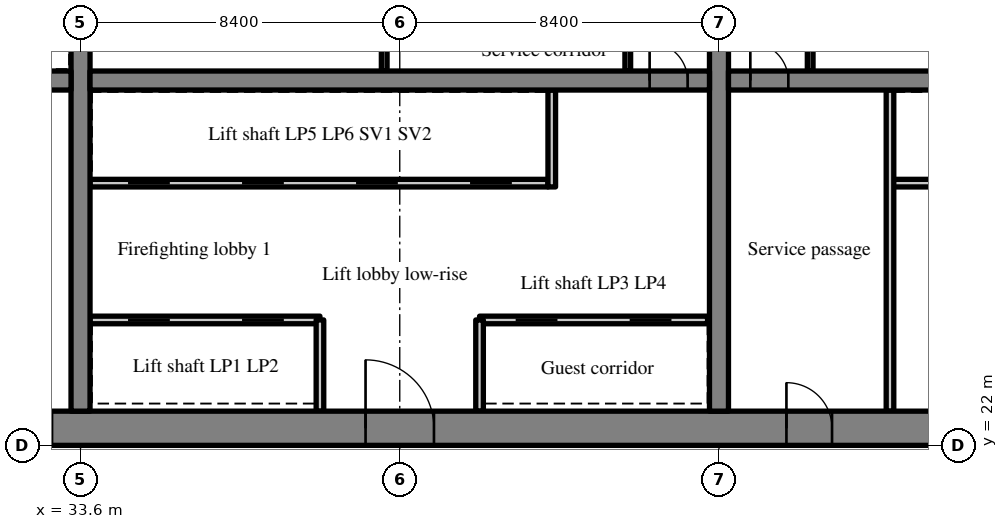
"""IFC4 building model, lengths in metres.
Left out: names, types, materials, properties, quantities, classifications, styles, units other than length and angle.
Written with IfcOpenShell. Run it as: python <this file> out.ifc"""

import sys

from ifc_helpers import new_model, si_unit, direction, frame, frame_2d, origin, place, context, subcontext, project, spatial, rectangle, extrude, source, transform, mapped, element, fill, save


model = new_model("IFC4")
c1 = context("Model", 3, precision=1e-05, world=origin(), true_north=direction((0.0, 1.0)))
c2 = subcontext(c1, "Body", "Model", "MODEL_VIEW")
j1 = project(units=[si_unit("LENGTHUNIT", "METRE"), si_unit("PLANEANGLEUNIT", "RADIAN")], contexts=[c1])
p1 = place(None, origin())
s1 = spatial("IfcSite", under=j1, at=p1, CompositionType="ELEMENT")
p2 = place(p1, origin())
s2 = spatial("IfcBuilding", under=s1, at=p2, CompositionType="ELEMENT")
p3 = place(p2, frame((0.0, 0.0, 106.6)))
s3 = spatial("IfcBuildingStorey", under=s2, at=p3, CompositionType="ELEMENT", Elevation=106.6)
m1 = source(origin(), c2, "Body", "SweptSolid", [
    extrude(rectangle(XDim=50.4, YDim=0.9, at=frame_2d((25.2, 0.0))), origin(), (0.0, 0.0, 1.0), 3.52),
])
p4 = place(p3, frame((25.2, 22.45, 0.0), z_axis=(0.0, 0.0, 1.0), x_axis=(1.0, 0.0, 0.0)))
e1 = element("IfcWall", 1, at=p4, inside=s3, PredefinedType="SHEAR", context=c2, shape_type="MappedRepresentation", body=[
    mapped(m1, transform((0.0, 0.0, 0.0), scale=1.0)),
])
m2 = source(origin(), c2, "Body", "SweptSolid", [
    extrude(rectangle(XDim=1.8, YDim=2.1, at=frame_2d((0.9, 1.05))), frame((0.0, 0.46, 0.0), z_axis=(0.0, -1.0, 0.0), x_axis=(1.0, 0.0, 0.0)), (0.0, 0.0, 1.0), 0.92),
])
p5 = place(p4, frame((15.9, 0.0, 0.0)))
e2 = element("IfcOpeningElement", 2, at=p5, cuts=e1, PredefinedType="OPENING", context=c2, shape_type="MappedRepresentation", body=[
    mapped(m2, transform((0.0, 0.0, 0.0), scale=1.0)),
])
m3 = source(origin(), c2, "Body", "SweptSolid", [
    extrude(rectangle(XDim=1.2, YDim=2.1, at=frame_2d((0.6, 1.05))), frame((0.0, 0.46, 0.0), z_axis=(0.0, -1.0, 0.0), x_axis=(1.0, 0.0, 0.0)), (0.0, 0.0, 1.0), 0.92),
])
p6 = place(p4, frame((26.975, 0.0, 0.0)))
e3 = element("IfcOpeningElement", 3, at=p6, cuts=e1, PredefinedType="OPENING", context=c2, shape_type="MappedRepresentation", body=[
    mapped(m3, transform((0.0, 0.0, 0.0), scale=1.0)),
])
m4 = source(origin(), c2, "Body", "SweptSolid", [
    extrude(rectangle(XDim=0.9, YDim=2.1, at=frame_2d((0.45, 1.05))), frame((0.0, 0.46, 0.0), z_axis=(0.0, -1.0, 0.0), x_axis=(1.0, 0.0, 0.0)), (0.0, 0.0, 1.0), 0.92),
])
p7 = place(p4, frame((32.25, 0.0, 0.0)))
e4 = element("IfcOpeningElement", 4, at=p7, cuts=e1, PredefinedType="OPENING", context=c2, shape_type="MappedRepresentation", body=[
    mapped(m4, transform((0.0, 0.0, 0.0), scale=1.0)),
])
p8 = place(p4, frame((38.275, 0.0, 0.0)))
e5 = element("IfcOpeningElement", 5, at=p8, cuts=e1, PredefinedType="OPENING", context=c2, shape_type="MappedRepresentation", body=[
    mapped(m4, transform((0.0, 0.0, 0.0), scale=1.0)),
])
p9 = place(p4, frame((6.45, 0.0, 0.0)))
e6 = element("IfcOpeningElement", 6, at=p9, cuts=e1, PredefinedType="OPENING", context=c2, shape_type="MappedRepresentation", body=[
    mapped(m3, transform((0.0, 0.0, 0.0), scale=1.0)),
])
p10 = place(p4, frame((47.775, 0.0, 0.0)))
e7 = element("IfcOpeningElement", 7, at=p10, cuts=e1, PredefinedType="OPENING", context=c2, shape_type="MappedRepresentation", body=[
    mapped(m3, transform((0.0, 0.0, 0.0), scale=1.0)),
])
m5 = source(origin(), c2, "Body", "SweptSolid", [
    extrude(rectangle(XDim=18.2, YDim=0.5, at=frame_2d((9.1, 0.0))), origin(), (0.0, 0.0, 1.0), 3.52),
])
p11 = place(p3, frame((33.6, 22.9, 0.0), z_axis=(0.0, 0.0, 1.0), x_axis=(0.0, 1.0, 0.0)))
e8 = element("IfcWall", 8, at=p11, inside=s3, PredefinedType="SHEAR", context=c2, shape_type="MappedRepresentation", body=[
    mapped(m5, transform((0.0, 0.0, 0.0), scale=1.0)),
])
m6 = source(origin(), c2, "Body", "SweptSolid", [
    extrude(rectangle(XDim=1.1, YDim=2.1, at=frame_2d((0.55, 1.05))), frame((0.0, 0.26, 0.0), z_axis=(0.0, -1.0, 0.0), x_axis=(1.0, 0.0, 0.0)), (0.0, 0.0, 1.0), 0.52),
])
p12 = place(p11, frame((12.55, 0.0, 0.0)))
e9 = element("IfcOpeningElement", 9, at=p12, cuts=e8, PredefinedType="OPENING", context=c2, shape_type="MappedRepresentation", body=[
    mapped(m6, transform((0.0, 0.0, 0.0), scale=1.0)),
])
p13 = place(p3, frame((50.4, 22.9, 0.0), z_axis=(0.0, 0.0, 1.0), x_axis=(0.0, 1.0, 0.0)))
e10 = element("IfcWall", 10, at=p13, inside=s3, PredefinedType="SHEAR", context=c2, shape_type="MappedRepresentation", body=[
    mapped(m5, transform((0.0, 0.0, 0.0), scale=1.0)),
])
p14 = place(p13, frame((12.55, 0.0, 0.0)))
e11 = element("IfcOpeningElement", 11, at=p14, cuts=e10, PredefinedType="OPENING", context=c2, shape_type="MappedRepresentation", body=[
    mapped(m6, transform((0.0, 0.0, 0.0), scale=1.0)),
])
m7 = source(origin(), c2, "Body", "SweptSolid", [
    extrude(rectangle(XDim=7.25, YDim=0.5, at=frame_2d((3.625, 0.0))), origin(), (0.0, 0.0, 1.0), 3.52),
])
p15 = place(p3, frame((26.1, 31.6, 0.0), z_axis=(0.0, 0.0, 1.0), x_axis=(1.0, 0.0, 0.0)))
e12 = element("IfcWall", 12, at=p15, inside=s3, PredefinedType="SHEAR", context=c2, shape_type="MappedRepresentation", body=[
    mapped(m7, transform((0.0, 0.0, 0.0), scale=1.0)),
])
p16 = place(p15, frame((5.6, 0.0, 0.0)))
e13 = element("IfcOpeningElement", 13, at=p16, cuts=e12, PredefinedType="OPENING", context=c2, shape_type="MappedRepresentation", body=[
    mapped(m6, transform((0.0, 0.0, 0.0), scale=1.0)),
])
m8 = source(origin(), c2, "Body", "SweptSolid", [
    extrude(rectangle(XDim=16.3, YDim=0.5, at=frame_2d((8.15, 0.0))), origin(), (0.0, 0.0, 1.0), 3.52),
])
p17 = place(p3, frame((33.85, 31.6, 0.0), z_axis=(0.0, 0.0, 1.0), x_axis=(1.0, 0.0, 0.0)))
e14 = element("IfcWall", 14, at=p17, inside=s3, PredefinedType="SHEAR", context=c2, shape_type="MappedRepresentation", body=[
    mapped(m8, transform((0.0, 0.0, 0.0), scale=1.0)),
])
m9 = source(origin(), c2, "Body", "SweptSolid", [
    extrude(rectangle(XDim=1.0, YDim=2.1, at=frame_2d((0.5, 1.05))), frame((0.0, 0.26, 0.0), z_axis=(0.0, -1.0, 0.0), x_axis=(1.0, 0.0, 0.0)), (0.0, 0.0, 1.0), 0.52),
])
p18 = place(p17, frame((14.725, 0.0, 0.0)))
e15 = element("IfcOpeningElement", 15, at=p18, cuts=e14, PredefinedType="OPENING", context=c2, shape_type="MappedRepresentation", body=[
    mapped(m9, transform((0.0, 0.0, 0.0), scale=1.0)),
])
m10 = source(origin(), c2, "Body", "SweptSolid", [
    extrude(rectangle(XDim=16.3, YDim=0.5, at=frame_2d((8.15, 0.0))), origin(), (0.0, 0.0, 1.0), 3.52),
])
p19 = place(p3, frame((50.65, 31.6, 0.0), z_axis=(0.0, 0.0, 1.0), x_axis=(1.0, 0.0, 0.0)))
e16 = element("IfcWall", 16, at=p19, inside=s3, PredefinedType="SHEAR", context=c2, shape_type="MappedRepresentation", body=[
    mapped(m10, transform((0.0, 0.0, 0.0), scale=1.0)),
])
p20 = place(p19, frame((0.575, 0.0, 0.0)))
e17 = element("IfcOpeningElement", 17, at=p20, cuts=e16, PredefinedType="OPENING", context=c2, shape_type="MappedRepresentation", body=[
    mapped(m9, transform((0.0, 0.0, 0.0), scale=1.0)),
])
m11 = source(origin(), c2, "Body", "SweptSolid", [
    extrude(rectangle(XDim=6.05, YDim=0.2, at=frame_2d((3.025, 0.0))), origin(), (0.0, 0.0, 1.0), 3.52),
])
p21 = place(p3, frame((33.85, 25.3, 0.0), z_axis=(0.0, 0.0, 1.0), x_axis=(1.0, 0.0, 0.0)))
e18 = element("IfcWall", 18, at=p21, inside=s3, PredefinedType="SOLIDWALL", context=c2, shape_type="MappedRepresentation", body=[
    mapped(m11, transform((0.0, 0.0, 0.0), scale=1.0)),
])
m12 = source(origin(), c2, "Body", "SweptSolid", [
    extrude(rectangle(XDim=1.1, YDim=2.1, at=frame_2d((0.55, 1.05))), frame((0.0, 0.11, 0.0), z_axis=(0.0, -1.0, 0.0), x_axis=(1.0, 0.0, 0.0)), (0.0, 0.0, 1.0), 0.22),
])
p22 = place(p21, frame((1.0, 0.0, 0.0)))
e19 = element("IfcOpeningElement", 19, at=p22, cuts=e18, PredefinedType="OPENING", context=c2, shape_type="MappedRepresentation", body=[
    mapped(m12, transform((0.0, 0.0, 0.0), scale=1.0)),
])
p23 = place(p21, frame((4.0, 0.0, 0.0)))
e20 = element("IfcOpeningElement", 20, at=p23, cuts=e18, PredefinedType="OPENING", context=c2, shape_type="MappedRepresentation", body=[
    mapped(m12, transform((0.0, 0.0, 0.0), scale=1.0)),
])
m13 = source(origin(), c2, "Body", "SweptSolid", [
    extrude(rectangle(XDim=6.0, YDim=0.2, at=frame_2d((3.0, 0.0))), origin(), (0.0, 0.0, 1.0), 3.52),
])
p24 = place(p3, frame((44.1, 25.3, 0.0), z_axis=(0.0, 0.0, 1.0), x_axis=(1.0, 0.0, 0.0)))
e21 = element("IfcWall", 21, at=p24, inside=s3, PredefinedType="SOLIDWALL", context=c2, shape_type="MappedRepresentation", body=[
    mapped(m13, transform((0.0, 0.0, 0.0), scale=1.0)),
])
p25 = place(p24, frame((0.95, 0.0, 0.0)))
e22 = element("IfcOpeningElement", 22, at=p25, cuts=e21, PredefinedType="OPENING", context=c2, shape_type="MappedRepresentation", body=[
    mapped(m12, transform((0.0, 0.0, 0.0), scale=1.0)),
])
p26 = place(p24, frame((3.95, 0.0, 0.0)))
e23 = element("IfcOpeningElement", 23, at=p26, cuts=e21, PredefinedType="OPENING", context=c2, shape_type="MappedRepresentation", body=[
    mapped(m12, transform((0.0, 0.0, 0.0), scale=1.0)),
])
m14 = source(origin(), c2, "Body", "SweptSolid", [
    extrude(rectangle(XDim=12.05, YDim=0.2, at=frame_2d((6.025, 0.0))), origin(), (0.0, 0.0, 1.0), 3.52),
])
p27 = place(p3, frame((33.85, 28.9, 0.0), z_axis=(0.0, 0.0, 1.0), x_axis=(1.0, 0.0, 0.0)))
e24 = element("IfcWall", 24, at=p27, inside=s3, PredefinedType="SOLIDWALL", context=c2, shape_type="MappedRepresentation", body=[
    mapped(m14, transform((0.0, 0.0, 0.0), scale=1.0)),
])
p28 = place(p27, frame((1.0, 0.0, 0.0)))
e25 = element("IfcOpeningElement", 25, at=p28, cuts=e24, PredefinedType="OPENING", context=c2, shape_type="MappedRepresentation", body=[
    mapped(m12, transform((0.0, 0.0, 0.0), scale=1.0)),
])
p29 = place(p27, frame((4.0, 0.0, 0.0)))
e26 = element("IfcOpeningElement", 26, at=p29, cuts=e24, PredefinedType="OPENING", context=c2, shape_type="MappedRepresentation", body=[
    mapped(m12, transform((0.0, 0.0, 0.0), scale=1.0)),
])
p30 = place(p27, frame((7.0, 0.0, 0.0)))
e27 = element("IfcOpeningElement", 27, at=p30, cuts=e24, PredefinedType="OPENING", context=c2, shape_type="MappedRepresentation", body=[
    mapped(m12, transform((0.0, 0.0, 0.0), scale=1.0)),
])
p31 = place(p27, frame((10.0, 0.0, 0.0)))
e28 = element("IfcOpeningElement", 28, at=p31, cuts=e24, PredefinedType="OPENING", context=c2, shape_type="MappedRepresentation", body=[
    mapped(m12, transform((0.0, 0.0, 0.0), scale=1.0)),
])
m15 = source(origin(), c2, "Body", "SweptSolid", [
    extrude(rectangle(XDim=2.4, YDim=0.2, at=frame_2d((1.2, 0.0))), origin(), (0.0, 0.0, 1.0), 3.52),
])
for number, where, z_axis, x_axis in (
    (29, (39.9, 22.9, 0.0), (0.0, 0.0, 1.0), (0.0, 1.0, 0.0)),
    (30, (44.1, 22.9, 0.0), (0.0, 0.0, 1.0), (0.0, 1.0, 0.0)),
):
    element("IfcWall", number, at=place(p3, frame(where, z_axis=z_axis, x_axis=x_axis)), inside=s3, PredefinedType="SOLIDWALL", context=c2, shape_type="MappedRepresentation", body=[
        mapped(m15, transform((0.0, 0.0, 0.0), scale=1.0)),
    ])
m16 = source(origin(), c2, "Body", "SweptSolid", [
    extrude(rectangle(XDim=2.55, YDim=0.2, at=frame_2d((1.275, 0.0))), origin(), (0.0, 0.0, 1.0), 3.52),
])
p32 = place(p3, frame((46.0, 28.8, 0.0), z_axis=(0.0, 0.0, 1.0), x_axis=(0.0, 1.0, 0.0)))
e31 = element("IfcWall", 31, at=p32, inside=s3, PredefinedType="SOLIDWALL", context=c2, shape_type="MappedRepresentation", body=[
    mapped(m16, transform((0.0, 0.0, 0.0), scale=1.0)),
])
m17 = source(origin(), c2, "Body", "SweptSolid", [
    extrude(rectangle(XDim=3.15, YDim=0.15, at=frame_2d((1.575, 0.0))), origin(), (0.0, 0.0, 1.0), 3.52),
])
for number, where, z_axis, x_axis in (
    (32, (48.0, 31.85, 0.0), (0.0, 0.0, 1.0), (0.0, 1.0, 0.0)),
    (33, (41.591, 31.85, 0.0), (0.0, 0.0, 1.0), (0.0, 1.0, 0.0)),
):
    element("IfcWall", number, at=place(p3, frame(where, z_axis=z_axis, x_axis=x_axis)), inside=s3, PredefinedType="PARTITIONING", context=c2, shape_type="MappedRepresentation", body=[
        mapped(m17, transform((0.0, 0.0, 0.0), scale=1.0)),
    ])
p33 = place(p3, frame((60.9, 28.9, 0.0), z_axis=(0.0, 0.0, 1.0), x_axis=(-1.0, 0.0, 0.0)))
e34 = element("IfcWall", 34, at=p33, inside=s3, PredefinedType="SOLIDWALL", context=c2, shape_type="MappedRepresentation", body=[
    mapped(m13, transform((0.0, 0.0, 0.0), scale=1.0)),
])
m18 = source(origin(), c2, "Body", "SweptSolid", [
    extrude(rectangle(XDim=8.45, YDim=0.2, at=frame_2d((4.225, 0.0))), origin(), (0.0, 0.0, 1.0), 3.52),
])
p34 = place(p3, frame((54.9, 22.9, 0.0), z_axis=(0.0, 0.0, 1.0), x_axis=(0.0, 1.0, 0.0)))
e35 = element("IfcWall", 35, at=p34, inside=s3, PredefinedType="PARTITIONING", context=c2, shape_type="MappedRepresentation", body=[
    mapped(m18, transform((0.0, 0.0, 0.0), scale=1.0)),
])
p35 = place(p3, frame((52.8, 31.85, 0.0), z_axis=(0.0, 0.0, 1.0), x_axis=(0.0, 1.0, 0.0)))
e36 = element("IfcWall", 36, at=p35, inside=s3, PredefinedType="PARTITIONING", context=c2, shape_type="MappedRepresentation", body=[
    mapped(m17, transform((0.0, 0.0, 0.0), scale=1.0)),
])
m19 = source(origin(), c2, "Body", "SweptSolid", [
    extrude(rectangle(XDim=1.8, YDim=2.1, at=frame_2d((0.9, 1.05))), frame((0.0, 0.375, 0.0), z_axis=(0.0, -1.0, 0.0), x_axis=(1.0, 0.0, 0.0)), (0.0, 0.0, 1.0), 0.05),
])
p36 = place(p5, origin())
e37 = element("IfcDoor", 37, at=p36, inside=s3, OperationType="DOUBLE_DOOR_SINGLE_SWING", PredefinedType="DOOR", context=c2, shape_type="MappedRepresentation", body=[
    mapped(m19, transform((0.0, 0.0, 0.0), scale=1.0)),
])
fill(e2, e37)
m20 = source(origin(), c2, "Body", "SweptSolid", [
    extrude(rectangle(XDim=1.0, YDim=2.1, at=frame_2d((0.5, 1.05))), frame((0.0, 0.025, 0.0), z_axis=(0.0, -1.0, 0.0), x_axis=(1.0, 0.0, 0.0)), (0.0, 0.0, 1.0), 0.05),
])
p37 = place(p18, origin())
e38 = element("IfcDoor", 38, at=p37, inside=s3, OperationType="SINGLE_SWING_LEFT", PredefinedType="DOOR", context=c2, shape_type="MappedRepresentation", body=[
    mapped(m20, transform((0.0, 0.0, 0.0), scale=1.0)),
])
fill(e15, e38)
m21 = source(origin(), c2, "Body", "SweptSolid", [
    extrude(rectangle(XDim=1.1, YDim=2.1, at=frame_2d((0.55, 1.05))), frame((0.0, 0.025, 0.0), z_axis=(0.0, -1.0, 0.0), x_axis=(1.0, 0.0, 0.0)), (0.0, 0.0, 1.0), 0.05),
])
p38 = place(p22, origin())
e39 = element("IfcDoor", 39, at=p38, inside=s3, OperationType="SLIDING_TO_LEFT", PredefinedType="DOOR", context=c2, shape_type="MappedRepresentation", body=[
    mapped(m21, transform((0.0, 0.0, 0.0), scale=1.0)),
])
fill(e19, e39)
p39 = place(p23, origin())
e40 = element("IfcDoor", 40, at=p39, inside=s3, OperationType="SLIDING_TO_RIGHT", PredefinedType="DOOR", context=c2, shape_type="MappedRepresentation", body=[
    mapped(m21, transform((0.0, 0.0, 0.0), scale=1.0)),
])
fill(e20, e40)
p40 = place(p25, origin())
e41 = element("IfcDoor", 41, at=p40, inside=s3, OperationType="SLIDING_TO_LEFT", PredefinedType="DOOR", context=c2, shape_type="MappedRepresentation", body=[
    mapped(m21, transform((0.0, 0.0, 0.0), scale=1.0)),
])
fill(e22, e41)
p41 = place(p26, origin())
e42 = element("IfcDoor", 42, at=p41, inside=s3, OperationType="SLIDING_TO_RIGHT", PredefinedType="DOOR", context=c2, shape_type="MappedRepresentation", body=[
    mapped(m21, transform((0.0, 0.0, 0.0), scale=1.0)),
])
fill(e23, e42)
p42 = place(p28, origin())
e43 = element("IfcDoor", 43, at=p42, inside=s3, OperationType="SLIDING_TO_LEFT", PredefinedType="DOOR", context=c2, shape_type="MappedRepresentation", body=[
    mapped(m21, transform((0.0, 0.0, 0.0), scale=1.0)),
])
fill(e25, e43)
p43 = place(p29, origin())
e44 = element("IfcDoor", 44, at=p43, inside=s3, OperationType="SLIDING_TO_RIGHT", PredefinedType="DOOR", context=c2, shape_type="MappedRepresentation", body=[
    mapped(m21, transform((0.0, 0.0, 0.0), scale=1.0)),
])
fill(e26, e44)
p44 = place(p30, origin())
e45 = element("IfcDoor", 45, at=p44, inside=s3, OperationType="SLIDING_TO_LEFT", PredefinedType="DOOR", context=c2, shape_type="MappedRepresentation", body=[
    mapped(m21, transform((0.0, 0.0, 0.0), scale=1.0)),
])
fill(e27, e45)
p45 = place(p31, origin())
e46 = element("IfcDoor", 46, at=p45, inside=s3, OperationType="SLIDING_TO_RIGHT", PredefinedType="DOOR", context=c2, shape_type="MappedRepresentation", body=[
    mapped(m21, transform((0.0, 0.0, 0.0), scale=1.0)),
])
fill(e28, e46)
m22 = source(origin(), c2, "Body", "SweptSolid", [
    extrude(rectangle(XDim=1.2, YDim=2.1, at=frame_2d((0.6, 1.05))), frame((0.0, 0.375, 0.0), z_axis=(0.0, -1.0, 0.0), x_axis=(1.0, 0.0, 0.0)), (0.0, 0.0, 1.0), 0.05),
])
p46 = place(p6, origin())
e47 = element("IfcDoor", 47, at=p46, inside=s3, OperationType="SINGLE_SWING_LEFT", PredefinedType="DOOR", context=c2, shape_type="MappedRepresentation", body=[
    mapped(m22, transform((0.0, 0.0, 0.0), scale=1.0)),
])
fill(e3, e47)
p47 = place(p20, origin())
e48 = element("IfcDoor", 48, at=p47, inside=s3, OperationType="SINGLE_SWING_LEFT", PredefinedType="DOOR", context=c2, shape_type="MappedRepresentation", body=[
    mapped(m20, transform((0.0, 0.0, 0.0), scale=1.0)),
])
fill(e17, e48)
save(model, sys.argv[1])
